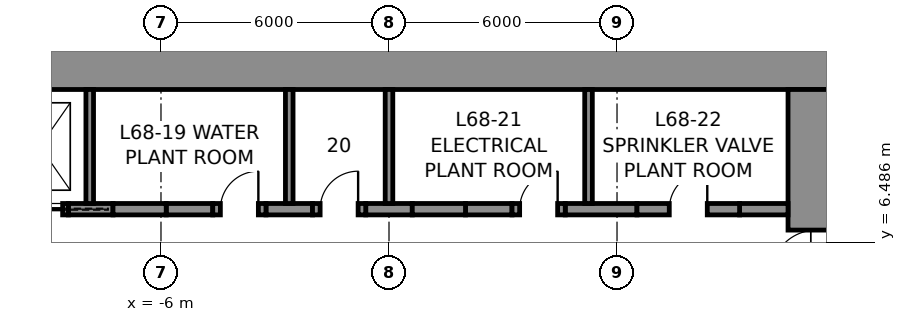
"""IFC4 building model, lengths in metres.
Left out: names, types, materials, properties, quantities, classifications, styles, units other than length and angle.
Written with IfcOpenShell. Run it as: python <this file> out.ifc"""

import sys

from ifc_helpers import new_model, si_unit, direction, frame, frame_2d, origin, place, context, subcontext, project, spatial, rectangle, extrude, element, fill, save


model = new_model("IFC4")
c1 = context("Model", 3, precision=1e-05, world=origin(), true_north=direction((0.0, 1.0)))
c2 = subcontext(c1, "Body", "Model", "MODEL_VIEW")
j1 = project(units=[si_unit("LENGTHUNIT", "METRE"), si_unit("PLANEANGLEUNIT", "RADIAN")], contexts=[c1])
p1 = place(None, origin())
s1 = spatial("IfcSite", under=j1, at=p1, CompositionType="ELEMENT")
p2 = place(p1, origin())
s2 = spatial("IfcBuilding", under=s1, at=p2, CompositionType="ELEMENT")
p3 = place(p2, frame((0.0, 0.0, 302.8)))
s3 = spatial("IfcBuildingStorey", under=s2, at=p3, CompositionType="ELEMENT", Elevation=302.8)
p4 = place(p3, frame((-12.0, 11.25, 0.0), z_axis=(0.0, 0.0, 1.0), x_axis=(1.0, 0.0, 0.0)))
e1 = element("IfcWall", 1, at=p4, inside=s3, PredefinedType="SHEAR", context=c2, shape_type="SweptSolid", body=[
    extrude(rectangle(XDim=24.0, YDim=1.5, at=frame_2d((12.0, 0.0))), origin(), (0.0, 0.0, 1.0), 5.0),
])
p5 = place(p3, frame((11.25, 10.5, 0.0), z_axis=(0.0, 0.0, 1.0), x_axis=(0.0, -1.0, 0.0)))
e2 = element("IfcWall", 2, at=p5, inside=s3, PredefinedType="SHEAR", context=c2, shape_type="SweptSolid", body=[
    extrude(rectangle(XDim=21.0, YDim=1.5, at=frame_2d((10.5, 0.0))), origin(), (0.0, 0.0, 1.0), 5.0),
])
p6 = place(p5, frame((3.7, 0.0, 0.0)))
e3 = element("IfcOpeningElement", 3, at=p6, cuts=e2, PredefinedType="OPENING", context=c2, shape_type="SweptSolid", body=[
    extrude(rectangle(XDim=1.2, YDim=2.3, at=frame_2d((0.6, 1.15))), frame((0.0, 0.76, 0.0), z_axis=(0.0, -1.0, 0.0), x_axis=(1.0, 0.0, 0.0)), (0.0, 0.0, 1.0), 1.52),
])
p7 = place(p5, frame((16.1, 0.0, 0.0)))
e4 = element("IfcOpeningElement", 4, at=p7, cuts=e2, PredefinedType="OPENING", context=c2, shape_type="SweptSolid", body=[
    extrude(rectangle(XDim=1.2, YDim=2.3, at=frame_2d((0.6, 1.15))), frame((0.0, 0.76, 0.0), z_axis=(0.0, -1.0, 0.0), x_axis=(1.0, 0.0, 0.0)), (0.0, 0.0, 1.0), 1.52),
])
p8 = place(p3, frame((-8.438, 7.35, 0.0), z_axis=(0.0, 0.0, 1.0), x_axis=(1.0, 0.0, 0.0)))
e5 = element("IfcWall", 5, at=p8, inside=s3, PredefinedType="SHEAR", context=c2, shape_type="SweptSolid", body=[
    extrude(rectangle(XDim=1.175, YDim=0.3, at=frame_2d((0.587, 0.0))), origin(), (0.0, 0.0, 1.0), 5.0),
])
for number, where, z_axis, x_axis in (
    (6, (-5.863, 7.35, 0.0), (0.0, 0.0, 1.0), (1.0, 0.0, 0.0)),
    (7, (-3.238, 7.35, 0.0), (0.0, 0.0, 1.0), (1.0, 0.0, 0.0)),
    (8, (-0.613, 7.35, 0.0), (0.0, 0.0, 1.0), (1.0, 0.0, 0.0)),
    (9, (2.012, 7.35, 0.0), (0.0, 0.0, 1.0), (1.0, 0.0, 0.0)),
):
    element("IfcWall", number, at=place(p3, frame(where, z_axis=z_axis, x_axis=x_axis)), inside=s3, PredefinedType="SHEAR", context=c2, shape_type="SweptSolid", body=[
        extrude(rectangle(XDim=1.225, YDim=0.3, at=frame_2d((0.613, 0.0))), origin(), (0.0, 0.0, 1.0), 5.0),
    ])
p9 = place(p3, frame((4.637, 7.35, 0.0), z_axis=(0.0, 0.0, 1.0), x_axis=(1.0, 0.0, 0.0)))
e10 = element("IfcWall", 10, at=p9, inside=s3, PredefinedType="SHEAR", context=c2, shape_type="SweptSolid", body=[
    extrude(rectangle(XDim=1.887, YDim=0.3, at=frame_2d((0.944, 0.0))), origin(), (0.0, 0.0, 1.0), 5.0),
])
p10 = place(p3, frame((9.225, 7.35, 0.0), z_axis=(0.0, 0.0, 1.0), x_axis=(1.0, 0.0, 0.0)))
e11 = element("IfcWall", 11, at=p10, inside=s3, PredefinedType="SHEAR", context=c2, shape_type="SweptSolid", body=[
    extrude(rectangle(XDim=1.275, YDim=0.3, at=frame_2d((0.637, 0.0))), origin(), (0.0, 0.0, 1.0), 5.0),
])
p11 = place(p3, frame((-9.938, 7.35, 0.0), z_axis=(0.0, 0.0, 1.0), x_axis=(1.0, 0.0, 0.0)))
e12 = element("IfcWall", 12, at=p11, inside=s3, PredefinedType="PARTITIONING", context=c2, shape_type="SweptSolid", body=[
    extrude(rectangle(XDim=1.5, YDim=0.3, at=frame_2d((0.75, 0.0))), origin(), (0.0, 0.0, 1.0), 5.0),
])
p12 = place(p11, frame((0.15, 0.0, 0.0)))
e13 = element("IfcOpeningElement", 13, at=p12, cuts=e12, PredefinedType="OPENING", context=c2, shape_type="SweptSolid", body=[
    extrude(rectangle(XDim=1.2, YDim=2.3, at=frame_2d((0.6, 1.15))), frame((0.0, 0.16, 0.0), z_axis=(0.0, -1.0, 0.0), x_axis=(1.0, 0.0, 0.0)), (0.0, 0.0, 1.0), 0.32),
])
p13 = place(p3, frame((-7.262, 7.35, 0.0), z_axis=(0.0, 0.0, 1.0), x_axis=(1.0, 0.0, 0.0)))
e14 = element("IfcWall", 14, at=p13, inside=s3, PredefinedType="PARTITIONING", context=c2, shape_type="SweptSolid", body=[
    extrude(rectangle(XDim=1.4, YDim=0.3, at=frame_2d((0.7, 0.0))), origin(), (0.0, 0.0, 1.0), 5.0),
])
p14 = place(p3, frame((-4.637, 7.35, 0.0), z_axis=(0.0, 0.0, 1.0), x_axis=(1.0, 0.0, 0.0)))
e15 = element("IfcWall", 15, at=p14, inside=s3, PredefinedType="PARTITIONING", context=c2, shape_type="SweptSolid", body=[
    extrude(rectangle(XDim=1.4, YDim=0.3, at=frame_2d((0.7, 0.0))), origin(), (0.0, 0.0, 1.0), 5.0),
])
p15 = place(p14, frame((0.2, 0.0, 0.0)))
e16 = element("IfcOpeningElement", 16, at=p15, cuts=e15, PredefinedType="OPENING", context=c2, shape_type="SweptSolid", body=[
    extrude(rectangle(XDim=1.0, YDim=2.3, at=frame_2d((0.5, 1.15))), frame((0.0, 0.16, 0.0), z_axis=(0.0, -1.0, 0.0), x_axis=(1.0, 0.0, 0.0)), (0.0, 0.0, 1.0), 0.32),
])
p16 = place(p3, frame((-2.012, 7.35, 0.0), z_axis=(0.0, 0.0, 1.0), x_axis=(1.0, 0.0, 0.0)))
e17 = element("IfcWall", 17, at=p16, inside=s3, PredefinedType="PARTITIONING", context=c2, shape_type="SweptSolid", body=[
    extrude(rectangle(XDim=1.4, YDim=0.3, at=frame_2d((0.7, 0.0))), origin(), (0.0, 0.0, 1.0), 5.0),
])
p17 = place(p16, frame((0.2, 0.0, 0.0)))
e18 = element("IfcOpeningElement", 18, at=p17, cuts=e17, PredefinedType="OPENING", context=c2, shape_type="SweptSolid", body=[
    extrude(rectangle(XDim=1.0, YDim=2.3, at=frame_2d((0.5, 1.15))), frame((0.0, 0.16, 0.0), z_axis=(0.0, -1.0, 0.0), x_axis=(1.0, 0.0, 0.0)), (0.0, 0.0, 1.0), 0.32),
])
p18 = place(p3, frame((0.613, 7.35, 0.0), z_axis=(0.0, 0.0, 1.0), x_axis=(1.0, 0.0, 0.0)))
e19 = element("IfcWall", 19, at=p18, inside=s3, PredefinedType="PARTITIONING", context=c2, shape_type="SweptSolid", body=[
    extrude(rectangle(XDim=1.4, YDim=0.3, at=frame_2d((0.7, 0.0))), origin(), (0.0, 0.0, 1.0), 5.0),
])
p19 = place(p3, frame((3.238, 7.35, 0.0), z_axis=(0.0, 0.0, 1.0), x_axis=(1.0, 0.0, 0.0)))
e20 = element("IfcWall", 20, at=p19, inside=s3, PredefinedType="PARTITIONING", context=c2, shape_type="SweptSolid", body=[
    extrude(rectangle(XDim=1.4, YDim=0.3, at=frame_2d((0.7, 0.0))), origin(), (0.0, 0.0, 1.0), 5.0),
])
p20 = place(p19, frame((0.2, 0.0, 0.0)))
e21 = element("IfcOpeningElement", 21, at=p20, cuts=e20, PredefinedType="OPENING", context=c2, shape_type="SweptSolid", body=[
    extrude(rectangle(XDim=1.0, YDim=2.3, at=frame_2d((0.5, 1.15))), frame((0.0, 0.16, 0.0), z_axis=(0.0, -1.0, 0.0), x_axis=(1.0, 0.0, 0.0)), (0.0, 0.0, 1.0), 0.32),
])
p21 = place(p3, frame((6.525, 7.35, 0.0), z_axis=(0.0, 0.0, 1.0), x_axis=(1.0, 0.0, 0.0)))
e22 = element("IfcWall", 22, at=p21, inside=s3, PredefinedType="PARTITIONING", context=c2, shape_type="SweptSolid", body=[
    extrude(rectangle(XDim=2.7, YDim=0.3, at=frame_2d((1.35, 0.0))), origin(), (0.0, 0.0, 1.0), 5.0),
])
p22 = place(p21, frame((0.85, 0.0, 0.0)))
e23 = element("IfcOpeningElement", 23, at=p22, cuts=e22, PredefinedType="OPENING", context=c2, shape_type="SweptSolid", body=[
    extrude(rectangle(XDim=1.0, YDim=2.3, at=frame_2d((0.5, 1.15))), frame((0.0, 0.16, 0.0), z_axis=(0.0, -1.0, 0.0), x_axis=(1.0, 0.0, 0.0)), (0.0, 0.0, 1.0), 0.32),
])
for number, where, z_axis, x_axis in (
    (24, (-7.875, 7.5, 0.0), (0.0, 0.0, 1.0), (0.0, 1.0, 0.0)),
    (25, (-2.625, 7.5, 0.0), (0.0, 0.0, 1.0), (0.0, 1.0, 0.0)),
    (26, (0.0, 7.5, 0.0), (0.0, 0.0, 1.0), (0.0, 1.0, 0.0)),
    (27, (5.25, 7.5, 0.0), (0.0, 0.0, 1.0), (0.0, 1.0, 0.0)),
):
    element("IfcWall", number, at=place(p3, frame(where, z_axis=z_axis, x_axis=x_axis)), inside=s3, PredefinedType="PARTITIONING", context=c2, shape_type="SweptSolid", body=[
        extrude(rectangle(XDim=3.0, YDim=0.2, at=frame_2d((1.5, 0.0))), origin(), (0.0, 0.0, 1.0), 5.0),
    ])
p23 = place(p15, origin())
e28 = element("IfcDoor", 28, at=p23, inside=s3, OperationType="SINGLE_SWING_RIGHT", PredefinedType="DOOR", context=c2, shape_type="SweptSolid", body=[
    extrude(rectangle(XDim=1.0, YDim=2.3, at=frame_2d((0.5, 1.15))), frame((0.0, 0.025, 0.0), z_axis=(0.0, -1.0, 0.0), x_axis=(1.0, 0.0, 0.0)), (0.0, 0.0, 1.0), 0.05),
])
fill(e16, e28)
p24 = place(p17, origin())
e29 = element("IfcDoor", 29, at=p24, inside=s3, OperationType="SINGLE_SWING_RIGHT", PredefinedType="DOOR", context=c2, shape_type="SweptSolid", body=[
    extrude(rectangle(XDim=1.0, YDim=2.3, at=frame_2d((0.5, 1.15))), frame((0.0, 0.025, 0.0), z_axis=(0.0, -1.0, 0.0), x_axis=(1.0, 0.0, 0.0)), (0.0, 0.0, 1.0), 0.05),
])
fill(e18, e29)
p25 = place(p20, origin())
e30 = element("IfcDoor", 30, at=p25, inside=s3, OperationType="SINGLE_SWING_RIGHT", PredefinedType="DOOR", context=c2, shape_type="SweptSolid", body=[
    extrude(rectangle(XDim=1.0, YDim=2.3, at=frame_2d((0.5, 1.15))), frame((0.0, 0.025, 0.0), z_axis=(0.0, -1.0, 0.0), x_axis=(1.0, 0.0, 0.0)), (0.0, 0.0, 1.0), 0.05),
])
fill(e21, e30)
p26 = place(p22, origin())
e31 = element("IfcDoor", 31, at=p26, inside=s3, OperationType="SINGLE_SWING_RIGHT", PredefinedType="DOOR", context=c2, shape_type="SweptSolid", body=[
    extrude(rectangle(XDim=1.0, YDim=2.3, at=frame_2d((0.5, 1.15))), frame((0.0, 0.025, 0.0), z_axis=(0.0, -1.0, 0.0), x_axis=(1.0, 0.0, 0.0)), (0.0, 0.0, 1.0), 0.05),
])
fill(e23, e31)
p27 = place(p6, frame((1.2, 0.0, 0.0), z_axis=(0.0, 0.0, 1.0), x_axis=(-1.0, 0.0, 0.0)))
e32 = element("IfcDoor", 32, at=p27, inside=s3, OperationType="SINGLE_SWING_LEFT", PredefinedType="DOOR", context=c2, shape_type="SweptSolid", body=[
    extrude(rectangle(XDim=1.2, YDim=2.3, at=frame_2d((0.6, 1.15))), frame((0.0, 0.025, 0.0), z_axis=(0.0, -1.0, 0.0), x_axis=(1.0, 0.0, 0.0)), (0.0, 0.0, 1.0), 0.05),
])
fill(e3, e32)
p28 = place(p12, frame((1.2, 0.0, 0.0), z_axis=(0.0, 0.0, 1.0), x_axis=(-1.0, 0.0, 0.0)))
e33 = element("IfcDoor", 33, at=p28, inside=s3, OperationType="SLIDING_TO_LEFT", PredefinedType="DOOR", context=c2, shape_type="SweptSolid", body=[
    extrude(rectangle(XDim=1.2, YDim=2.3, at=frame_2d((0.6, 1.15))), frame((0.0, 0.025, 0.0), z_axis=(0.0, -1.0, 0.0), x_axis=(1.0, 0.0, 0.0)), (0.0, 0.0, 1.0), 0.05),
])
fill(e13, e33)
save(model, sys.argv[1])
